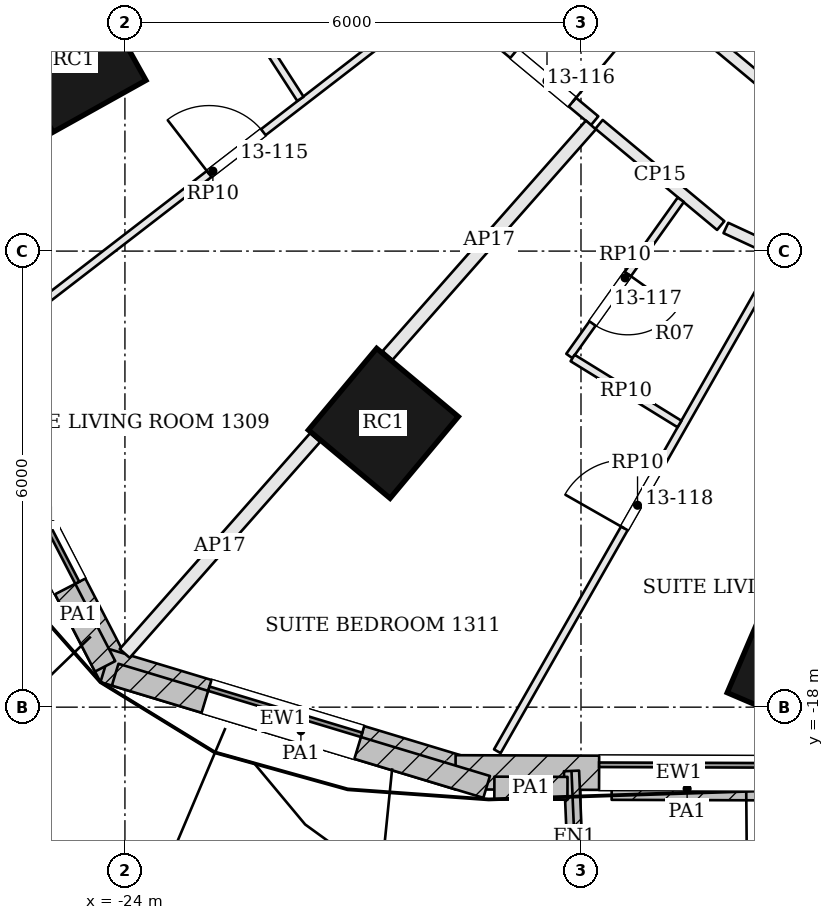
"""IFC4 building model, lengths in metres.
Left out: names, types, materials, properties, quantities, classifications, styles, units other than length and angle.
Written with IfcOpenShell. Run it as: python <this file> out.ifc"""

import sys

from ifc_helpers import new_model, si_unit, direction, frame, frame_2d, origin, origin_2d, place, context, subcontext, project, spatial, rectangle, extrude, element, fill, save


model = new_model("IFC4")
c1 = context("Model", 3, precision=1e-05, world=origin(), true_north=direction((0.0, 1.0)))
c2 = subcontext(c1, "Body", "Model", "MODEL_VIEW")
j1 = project(units=[si_unit("LENGTHUNIT", "METRE"), si_unit("PLANEANGLEUNIT", "RADIAN")], contexts=[c1])
p1 = place(None, origin())
s1 = spatial("IfcSite", under=j1, at=p1, CompositionType="ELEMENT")
p2 = place(p1, origin())
s2 = spatial("IfcBuilding", under=s1, at=p2, CompositionType="ELEMENT")
p3 = place(p2, frame((0.0, 0.0, 62.7)))
s3 = spatial("IfcBuildingStorey", under=s2, at=p3, CompositionType="ELEMENT", Elevation=62.7)
for number, where, z_axis, x_axis in (
    (1, (-24.676, -9.483, 0.0), (0.0, 0.0, 1.0), (0.487, -0.873, 0.0)),
    (2, (-20.6, -14.266, 0.0), (0.0, 0.0, 1.0), (0.767, -0.641, 0.0)),
    (3, (-15.157, -17.441, 0.0), (0.0, 0.0, 1.0), (0.919, -0.394, 0.0)),
):
    element("IfcColumn", number, at=place(p3, frame(where, z_axis=z_axis, x_axis=x_axis)), inside=s3, PredefinedType="COLUMN", context=c2, shape_type="SweptSolid", body=[
        extrude(rectangle(XDim=1.4, YDim=1.4, at=origin_2d()), origin(), (0.0, 0.0, 1.0), 3.6),
    ])
p4 = place(p3, frame((-26.283, -13.391, 0.0), z_axis=(0.0, 0.0, 1.0), x_axis=(0.459485057932, -0.888185499509, 0.0)))
e4 = element("IfcWall", 4, at=p4, inside=s3, PredefinedType="SOLIDWALL", context=c2, shape_type="SweptSolid", body=[
    extrude(rectangle(XDim=4.703, YDim=0.45, at=frame_2d((2.352, 0.0))), origin(), (0.0, 0.0, 1.0), 3.4),
])
p5 = place(p4, frame((1.302, 0.0, 0.9)))
e5 = element("IfcOpeningElement", 5, at=p5, cuts=e4, PredefinedType="OPENING", context=c2, shape_type="SweptSolid", body=[
    extrude(rectangle(XDim=2.1, YDim=2.0, at=frame_2d((1.05, 1.0))), frame((0.0, 0.235, 0.0), z_axis=(0.0, -1.0, 0.0), x_axis=(1.0, 0.0, 0.0)), (0.0, 0.0, 1.0), 0.47),
])
p6 = place(p3, frame((-24.257, -17.456, 0.0), z_axis=(0.0, 0.0, 1.0), x_axis=(0.957268138294, -0.289201852359, 0.0)))
e6 = element("IfcWall", 6, at=p6, inside=s3, PredefinedType="SOLIDWALL", context=c2, shape_type="SweptSolid", body=[
    extrude(rectangle(XDim=4.879, YDim=0.45, at=frame_2d((2.44, 0.0))), origin(), (0.0, 0.0, 1.0), 3.4),
])
p7 = place(p6, frame((1.39, 0.0, 0.9)))
e7 = element("IfcOpeningElement", 7, at=p7, cuts=e6, PredefinedType="OPENING", context=c2, shape_type="SweptSolid", body=[
    extrude(rectangle(XDim=2.1, YDim=2.0, at=frame_2d((1.05, 1.0))), frame((0.0, 0.235, 0.0), z_axis=(0.0, -1.0, 0.0), x_axis=(1.0, 0.0, 0.0)), (0.0, 0.0, 1.0), 0.47),
])
p8 = place(p3, frame((-19.65, -18.857, 0.0), z_axis=(0.0, 0.0, 1.0), x_axis=(0.999994750773, -0.003240127552, 0.0)))
e8 = element("IfcWall", 8, at=p8, inside=s3, PredefinedType="SOLIDWALL", context=c2, shape_type="SweptSolid", body=[
    extrude(rectangle(XDim=5.877, YDim=0.45, at=frame_2d((2.938, 0.0))), origin(), (0.0, 0.0, 1.0), 3.4),
])
p9 = place(p8, frame((1.889, 0.0, 0.9)))
e9 = element("IfcOpeningElement", 9, at=p9, cuts=e8, PredefinedType="OPENING", context=c2, shape_type="SweptSolid", body=[
    extrude(rectangle(XDim=2.1, YDim=2.0, at=frame_2d((1.05, 1.0))), frame((0.0, 0.235, 0.0), z_axis=(0.0, -1.0, 0.0), x_axis=(1.0, 0.0, 0.0)), (0.0, 0.0, 1.0), 0.47),
])
p10 = place(p3, frame((-18.125, -18.839, 0.0), z_axis=(0.0, 0.0, 1.0), x_axis=(0.042274699855, -0.999106025281, 0.0)))
e10 = element("IfcWall", 10, at=p10, inside=s3, PredefinedType="SOLIDWALL", context=c2, shape_type="SweptSolid", body=[
    extrude(rectangle(XDim=1.75, YDim=0.2, at=frame_2d((0.875, 0.0))), origin(), (0.0, 0.0, 1.0), 3.4),
])
p11 = place(p3, frame((-24.965, -16.101, 3.6), z_axis=(0.0, 0.0, 1.0), x_axis=(0.459461897951, -0.88819748048, 0.0)))
e11 = element("IfcWall", 11, at=p11, inside=s3, PredefinedType="PARAPET", context=c2, shape_type="SweptSolid", body=[
    extrude(rectangle(XDim=1.533, YDim=0.3, at=frame_2d((0.767, 0.0))), origin(), (0.0, 0.0, 1.0), 1.1),
])
p12 = place(p3, frame((-24.128, -17.573, 3.6), z_axis=(0.0, 0.0, 1.0), x_axis=(0.95727702005, -0.289172451806, 0.0)))
e12 = element("IfcWall", 12, at=p12, inside=s3, PredefinedType="PARAPET", context=c2, shape_type="SweptSolid", body=[
    extrude(rectangle(XDim=5.105, YDim=0.3, at=frame_2d((2.553, 0.0))), origin(), (0.0, 0.0, 1.0), 1.1),
])
p13 = place(p3, frame((-19.14, -19.064, 3.6), z_axis=(0.0, 0.0, 1.0), x_axis=(0.999994556719, -0.003299474426, 0.0)))
e13 = element("IfcWall", 13, at=p13, inside=s3, PredefinedType="PARAPET", context=c2, shape_type="SweptSolid", body=[
    extrude(rectangle(XDim=0.962, YDim=0.3, at=frame_2d((0.481, 0.0))), origin(), (0.0, 0.0, 1.0), 1.1),
])
p14 = place(p3, frame((-17.596, -19.069, 3.6), z_axis=(0.0, 0.0, 1.0), x_axis=(0.999994488127, -0.003320198128, 0.0)))
e14 = element("IfcWall", 14, at=p14, inside=s3, PredefinedType="PARAPET", context=c2, shape_type="SweptSolid", body=[
    extrude(rectangle(XDim=1.985, YDim=0.3, at=frame_2d((0.993, 0.0))), origin(), (0.0, 0.0, 1.0), 1.1),
])
p15 = place(p3, frame((-19.074, -9.241, 0.0), z_axis=(0.0, 0.0, 1.0), x_axis=(0.768797522642, -0.639492274527, 0.0)))
e15 = element("IfcWall", 15, at=p15, inside=s3, PredefinedType="PARTITIONING", context=c2, shape_type="SweptSolid", body=[
    extrude(rectangle(XDim=1.631, YDim=0.15, at=frame_2d((0.816, 0.0))), origin(), (0.0, 0.0, 1.0), 2.68),
])
p16 = place(p15, frame((0.25, 0.0, 0.0)))
e16 = element("IfcOpeningElement", 16, at=p16, cuts=e15, PredefinedType="OPENING", context=c2, shape_type="SweptSolid", body=[
    extrude(rectangle(XDim=1.0, YDim=2.1, at=frame_2d((0.5, 1.05))), frame((0.0, 0.085, 0.0), z_axis=(0.0, -1.0, 0.0), x_axis=(1.0, 0.0, 0.0)), (0.0, 0.0, 1.0), 0.17),
])
p17 = place(p3, frame((-24.003, -17.293, 0.0), z_axis=(0.0, 0.0, 1.0), x_axis=(0.661561928072, 0.749890535562, 0.0)))
e17 = element("IfcWall", 17, at=p17, inside=s3, PredefinedType="PARTITIONING", context=c2, shape_type="SweptSolid", body=[
    extrude(rectangle(XDim=3.787, YDim=0.175, at=frame_2d((1.893, 0.0))), origin(), (0.0, 0.0, 1.0), 2.68),
])
p18 = place(p3, frame((-20.545, -13.373, 0.0), z_axis=(0.0, 0.0, 1.0), x_axis=(0.66156772741, 0.74988541928, 0.0)))
e18 = element("IfcWall", 18, at=p18, inside=s3, PredefinedType="PARTITIONING", context=c2, shape_type="SweptSolid", body=[
    extrude(rectangle(XDim=4.044, YDim=0.175, at=frame_2d((2.022, 0.0))), origin(), (0.0, 0.0, 1.0), 2.68),
])
p19 = place(p3, frame((-17.762, -10.333, 0.0), z_axis=(0.0, 0.0, 1.0), x_axis=(0.768864852283, -0.639411322174, 0.0)))
e19 = element("IfcWall", 19, at=p19, inside=s3, PredefinedType="PARTITIONING", context=c2, shape_type="SweptSolid", body=[
    extrude(rectangle(XDim=2.082, YDim=0.15, at=frame_2d((1.041, 0.0))), origin(), (0.0, 0.0, 1.0), 2.68),
])
p20 = place(p3, frame((-16.094, -11.696, 0.0), z_axis=(0.0, 0.0, 1.0), x_axis=(0.907210631987, -0.420676680135, 0.0)))
e20 = element("IfcWall", 20, at=p20, inside=s3, PredefinedType="PARTITIONING", context=c2, shape_type="SweptSolid", body=[
    extrude(rectangle(XDim=4.341, YDim=0.15, at=frame_2d((2.17, 0.0))), origin(), (0.0, 0.0, 1.0), 2.68),
])
p21 = place(p20, frame((2.072, 0.0, 0.0)))
e21 = element("IfcOpeningElement", 21, at=p21, cuts=e20, PredefinedType="OPENING", context=c2, shape_type="SweptSolid", body=[
    extrude(rectangle(XDim=1.0, YDim=2.1, at=frame_2d((0.5, 1.05))), frame((0.0, 0.085, 0.0), z_axis=(0.0, -1.0, 0.0), x_axis=(1.0, 0.0, 0.0)), (0.0, 0.0, 1.0), 0.17),
])
p22 = place(p3, frame((-15.24, -10.09, 0.0), z_axis=(0.0, 0.0, 1.0), x_axis=(-0.768799656378, 0.639489709341, 0.0)))
e22 = element("IfcWall", 22, at=p22, inside=s3, PredefinedType="PARTITIONING", context=c2, shape_type="SweptSolid", body=[
    extrude(rectangle(XDim=3.285, YDim=0.15, at=frame_2d((1.643, 0.0))), origin(), (0.0, 0.0, 1.0), 2.68),
])
p23 = place(p3, frame((-26.021, -13.398, 0.0), z_axis=(0.0, 0.0, 1.0), x_axis=(0.791898657623, 0.610652532996, 0.0)))
e23 = element("IfcWall", 23, at=p23, inside=s3, PredefinedType="PARTITIONING", context=c2, shape_type="SweptSolid", body=[
    extrude(rectangle(XDim=8.027, YDim=0.1, at=frame_2d((4.013, 0.0))), origin(), (0.0, 0.0, 1.0), 2.68),
])
p24 = place(p23, frame((3.952, 0.0, 0.0)))
e24 = element("IfcOpeningElement", 24, at=p24, cuts=e23, PredefinedType="OPENING", context=c2, shape_type="SweptSolid", body=[
    extrude(rectangle(XDim=0.9, YDim=2.4, at=frame_2d((0.45, 1.2))), frame((0.0, 0.06, 0.0), z_axis=(0.0, -1.0, 0.0), x_axis=(1.0, 0.0, 0.0)), (0.0, 0.0, 1.0), 0.12),
])
p25 = place(p3, frame((-22.598, -8.593, 0.0), z_axis=(0.0, 0.0, 1.0), x_axis=(0.542403012008, -0.840118427702, 0.0)))
e25 = element("IfcWall", 25, at=p25, inside=s3, PredefinedType="PARTITIONING", context=c2, shape_type="SweptSolid", body=[
    extrude(rectangle(XDim=1.671, YDim=0.1, at=frame_2d((0.835, 0.0))), origin(), (0.0, 0.0, 1.0), 2.68),
])
p26 = place(p3, frame((-19.101, -18.58, 0.0), z_axis=(0.0, 0.0, 1.0), x_axis=(0.495157532616, 0.868803210108, 0.0)))
e26 = element("IfcWall", 26, at=p26, inside=s3, PredefinedType="PARTITIONING", context=c2, shape_type="SweptSolid", body=[
    extrude(rectangle(XDim=7.45, YDim=0.1, at=frame_2d((3.725, 0.0))), origin(), (0.0, 0.0, 1.0), 2.68),
])
p27 = place(p26, frame((3.375, 0.0, 0.0)))
e27 = element("IfcOpeningElement", 27, at=p27, cuts=e26, PredefinedType="OPENING", context=c2, shape_type="SweptSolid", body=[
    extrude(rectangle(XDim=0.9, YDim=2.4, at=frame_2d((0.45, 1.2))), frame((0.0, 0.06, 0.0), z_axis=(0.0, -1.0, 0.0), x_axis=(1.0, 0.0, 0.0)), (0.0, 0.0, 1.0), 0.12),
])
p28 = place(p3, frame((-16.687, -11.324, 0.0), z_axis=(0.0, 0.0, 1.0), x_axis=(-0.580533698553, -0.814236221771, 0.0)))
e28 = element("IfcWall", 28, at=p28, inside=s3, PredefinedType="PARTITIONING", context=c2, shape_type="SweptSolid", body=[
    extrude(rectangle(XDim=2.525, YDim=0.1, at=frame_2d((1.262, 0.0))), origin(), (0.0, 0.0, 1.0), 2.68),
])
p29 = place(p28, frame((1.2, 0.0, 0.0)))
e29 = element("IfcOpeningElement", 29, at=p29, cuts=e28, PredefinedType="OPENING", context=c2, shape_type="SweptSolid", body=[
    extrude(rectangle(XDim=0.8, YDim=2.1, at=frame_2d((0.4, 1.05))), frame((0.0, 0.06, 0.0), z_axis=(0.0, -1.0, 0.0), x_axis=(1.0, 0.0, 0.0)), (0.0, 0.0, 1.0), 0.12),
])
p30 = place(p3, frame((-18.11, -13.406, 0.0), z_axis=(0.0, 0.0, 1.0), x_axis=(0.850932033391, -0.525275808075, 0.0)))
e30 = element("IfcWall", 30, at=p30, inside=s3, PredefinedType="PARTITIONING", context=c2, shape_type="SweptSolid", body=[
    extrude(rectangle(XDim=1.652, YDim=0.1, at=frame_2d((0.826, 0.0))), origin(), (0.0, 0.0, 1.0), 2.68),
])
p31 = place(p5, origin())
e31 = element("IfcWindow", 31, at=p31, inside=s3, PartitioningType="SINGLE_PANEL", PredefinedType="WINDOW", context=c2, shape_type="SweptSolid", body=[
    extrude(rectangle(XDim=2.1, YDim=2.0, at=frame_2d((1.05, 1.0))), frame((0.0, 0.135, 0.0), z_axis=(0.0, -1.0, 0.0), x_axis=(1.0, 0.0, 0.0)), (0.0, 0.0, 1.0), 0.06),
])
fill(e5, e31)
p32 = place(p7, origin())
e32 = element("IfcWindow", 32, at=p32, inside=s3, PartitioningType="SINGLE_PANEL", PredefinedType="WINDOW", context=c2, shape_type="SweptSolid", body=[
    extrude(rectangle(XDim=2.1, YDim=2.0, at=frame_2d((1.05, 1.0))), frame((0.0, 0.135, 0.0), z_axis=(0.0, -1.0, 0.0), x_axis=(1.0, 0.0, 0.0)), (0.0, 0.0, 1.0), 0.06),
])
fill(e7, e32)
p33 = place(p9, origin())
e33 = element("IfcWindow", 33, at=p33, inside=s3, PartitioningType="SINGLE_PANEL", PredefinedType="WINDOW", context=c2, shape_type="SweptSolid", body=[
    extrude(rectangle(XDim=2.1, YDim=2.0, at=frame_2d((1.05, 1.0))), frame((0.0, 0.135, 0.0), z_axis=(0.0, -1.0, 0.0), x_axis=(1.0, 0.0, 0.0)), (0.0, 0.0, 1.0), 0.06),
])
fill(e9, e33)
p34 = place(p24, origin())
e34 = element("IfcDoor", 34, at=p34, inside=s3, OperationType="SINGLE_SWING_LEFT", PredefinedType="DOOR", context=c2, shape_type="SweptSolid", body=[
    extrude(rectangle(XDim=0.9, YDim=2.4, at=frame_2d((0.45, 1.2))), frame((0.0, 0.025, 0.0), z_axis=(0.0, -1.0, 0.0), x_axis=(1.0, 0.0, 0.0)), (0.0, 0.0, 1.0), 0.05),
])
fill(e24, e34)
p35 = place(p16, origin())
e35 = element("IfcDoor", 35, at=p35, inside=s3, OperationType="SINGLE_SWING_RIGHT", PredefinedType="DOOR", context=c2, shape_type="SweptSolid", body=[
    extrude(rectangle(XDim=1.0, YDim=2.1, at=frame_2d((0.5, 1.05))), frame((0.0, 0.025, 0.0), z_axis=(0.0, -1.0, 0.0), x_axis=(1.0, 0.0, 0.0)), (0.0, 0.0, 1.0), 0.05),
])
fill(e16, e35)
p36 = place(p29, origin())
e36 = element("IfcDoor", 36, at=p36, inside=s3, OperationType="SINGLE_SWING_LEFT", PredefinedType="DOOR", context=c2, shape_type="SweptSolid", body=[
    extrude(rectangle(XDim=0.8, YDim=2.1, at=frame_2d((0.4, 1.05))), frame((0.0, 0.025, 0.0), z_axis=(0.0, -1.0, 0.0), x_axis=(1.0, 0.0, 0.0)), (0.0, 0.0, 1.0), 0.05),
])
fill(e29, e36)
p37 = place(p27, origin())
e37 = element("IfcDoor", 37, at=p37, inside=s3, OperationType="SINGLE_SWING_LEFT", PredefinedType="DOOR", context=c2, shape_type="SweptSolid", body=[
    extrude(rectangle(XDim=0.9, YDim=2.4, at=frame_2d((0.45, 1.2))), frame((0.0, 0.025, 0.0), z_axis=(0.0, -1.0, 0.0), x_axis=(1.0, 0.0, 0.0)), (0.0, 0.0, 1.0), 0.05),
])
fill(e27, e37)
save(model, sys.argv[1])
